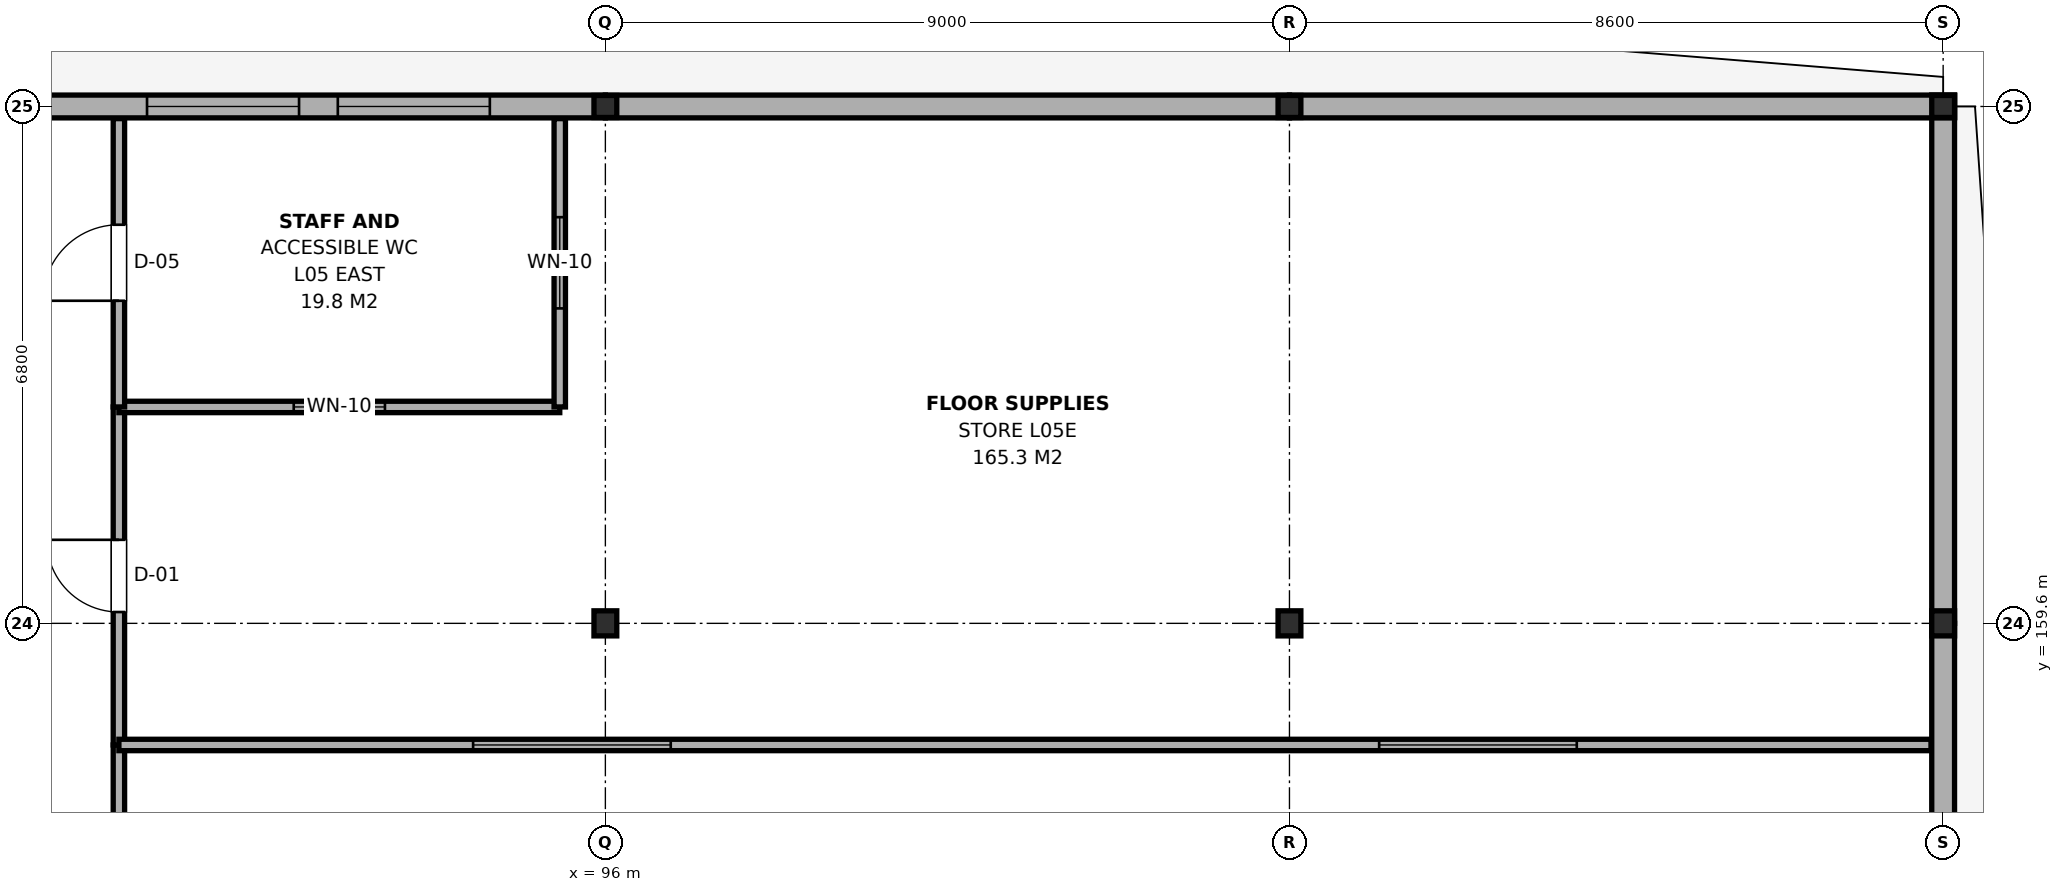
"""IFC4 building model, lengths in metres.
Left out: names, types, materials, properties, quantities, classifications, styles, units other than length and angle.
Written with IfcOpenShell. Run it as: python <this file> out.ifc"""

import sys

from ifc_helpers import new_model, si_unit, direction, frame, frame_2d, origin, origin_2d, place, context, subcontext, project, spatial, rectangle, i_section, extrude, element, fill, save


model = new_model("IFC4")
c1 = context("Model", 3, precision=1e-05, world=origin(), true_north=direction((0.0, 1.0)))
c2 = subcontext(c1, "Body", "Model", "MODEL_VIEW")
j1 = project(units=[si_unit("LENGTHUNIT", "METRE"), si_unit("PLANEANGLEUNIT", "RADIAN")], contexts=[c1])
p1 = place(None, origin())
s1 = spatial("IfcSite", under=j1, at=p1, CompositionType="ELEMENT")
p2 = place(p1, origin())
s2 = spatial("IfcBuilding", under=s1, at=p2, CompositionType="ELEMENT")
p3 = place(p2, frame((0.0, 0.0, 21.0)))
s3 = spatial("IfcBuildingStorey", under=s2, at=p3, CompositionType="ELEMENT", Elevation=21.0)
p4 = place(p3, frame((96.0, 159.6, 0.0), z_axis=(0.0, 0.0, 1.0), x_axis=(1.0, 0.0, 0.0)))
e1 = element("IfcColumn", 1, at=p4, inside=s3, PredefinedType="COLUMN", context=c2, shape_type="SweptSolid", body=[
    extrude(i_section(OverallWidth=0.3, OverallDepth=0.33, WebThickness=0.01, FlangeThickness=0.017, FilletRadius=0.027, at=origin_2d()), origin(), (0.0, 0.0, 1.0), 3.7),
])
p5 = place(p3, frame((96.0, 166.4, 0.0), z_axis=(0.0, 0.0, 1.0), x_axis=(1.0, 0.0, 0.0)))
e2 = element("IfcColumn", 2, at=p5, inside=s3, PredefinedType="COLUMN", context=c2, shape_type="SweptSolid", body=[
    extrude(i_section(OverallWidth=0.3, OverallDepth=0.29, WebThickness=0.009, FlangeThickness=0.014, FilletRadius=0.027, at=origin_2d()), origin(), (0.0, 0.0, 1.0), 3.7),
])
p6 = place(p3, frame((105.0, 159.6, 0.0), z_axis=(0.0, 0.0, 1.0), x_axis=(1.0, 0.0, 0.0)))
e3 = element("IfcColumn", 3, at=p6, inside=s3, PredefinedType="COLUMN", context=c2, shape_type="SweptSolid", body=[
    extrude(i_section(OverallWidth=0.3, OverallDepth=0.33, WebThickness=0.01, FlangeThickness=0.017, FilletRadius=0.027, at=origin_2d()), origin(), (0.0, 0.0, 1.0), 3.7),
])
p7 = place(p3, frame((105.0, 166.4, 0.0), z_axis=(0.0, 0.0, 1.0), x_axis=(1.0, 0.0, 0.0)))
e4 = element("IfcColumn", 4, at=p7, inside=s3, PredefinedType="COLUMN", context=c2, shape_type="SweptSolid", body=[
    extrude(i_section(OverallWidth=0.3, OverallDepth=0.29, WebThickness=0.009, FlangeThickness=0.014, FilletRadius=0.027, at=origin_2d()), origin(), (0.0, 0.0, 1.0), 3.7),
])
p8 = place(p3, frame((113.6, 159.6, 0.0), z_axis=(0.0, 0.0, 1.0), x_axis=(1.0, 0.0, 0.0)))
e5 = element("IfcColumn", 5, at=p8, inside=s3, PredefinedType="COLUMN", context=c2, shape_type="SweptSolid", body=[
    extrude(i_section(OverallWidth=0.3, OverallDepth=0.33, WebThickness=0.01, FlangeThickness=0.017, FilletRadius=0.027, at=origin_2d()), origin(), (0.0, 0.0, 1.0), 3.7),
])
p9 = place(p3, frame((113.6, 166.4, 0.0), z_axis=(0.0, 0.0, 1.0), x_axis=(1.0, 0.0, 0.0)))
e6 = element("IfcColumn", 6, at=p9, inside=s3, PredefinedType="COLUMN", context=c2, shape_type="SweptSolid", body=[
    extrude(i_section(OverallWidth=0.3, OverallDepth=0.29, WebThickness=0.009, FlangeThickness=0.014, FilletRadius=0.027, at=origin_2d()), origin(), (0.0, 0.0, 1.0), 3.7),
])
p10 = place(p3, frame((113.6, 152.4, 0.0), z_axis=(0.0, 0.0, 1.0), x_axis=(0.0, 1.0, 0.0)))
e7 = element("IfcWall", 7, at=p10, inside=s3, PredefinedType="SOLIDWALL", context=c2, shape_type="SweptSolid", body=[
    extrude(rectangle(XDim=7.2, YDim=0.3, at=frame_2d((3.6, 0.0))), origin(), (0.0, 0.0, 1.0), 3.095),
])
p11 = place(p10, frame((2.7, 0.0, 0.65)))
e8 = element("IfcOpeningElement", 8, at=p11, cuts=e7, PredefinedType="OPENING", context=c2, shape_type="SweptSolid", body=[
    extrude(rectangle(XDim=1.8, YDim=1.2, at=frame_2d((0.9, 0.6))), frame((0.0, 0.165, 0.0), z_axis=(0.0, -1.0, 0.0), x_axis=(1.0, 0.0, 0.0)), (0.0, 0.0, 1.0), 0.33),
])
p12 = place(p3, frame((113.6, 159.6, 0.0), z_axis=(0.0, 0.0, 1.0), x_axis=(0.0, 1.0, 0.0)))
e9 = element("IfcWall", 9, at=p12, inside=s3, PredefinedType="SOLIDWALL", context=c2, shape_type="SweptSolid", body=[
    extrude(rectangle(XDim=6.95, YDim=0.3, at=frame_2d((3.475, 0.0))), origin(), (0.0, 0.0, 1.0), 3.095),
])
p13 = place(p3, frame((87.0, 166.4, 0.0), z_axis=(0.0, 0.0, 1.0), x_axis=(1.0, 0.0, 0.0)))
e10 = element("IfcWall", 10, at=p13, inside=s3, PredefinedType="SOLIDWALL", context=c2, shape_type="SweptSolid", body=[
    extrude(rectangle(XDim=9.0, YDim=0.3, at=frame_2d((4.5, 0.0))), origin(), (0.0, 0.0, 1.0), 3.155),
])
p14 = place(p13, frame((2.97, 0.0, 0.65)))
e11 = element("IfcOpeningElement", 11, at=p14, cuts=e10, PredefinedType="OPENING", context=c2, shape_type="SweptSolid", body=[
    extrude(rectangle(XDim=2.0, YDim=1.8, at=frame_2d((1.0, 0.9))), frame((0.0, 0.165, 0.0), z_axis=(0.0, -1.0, 0.0), x_axis=(1.0, 0.0, 0.0)), (0.0, 0.0, 1.0), 0.33),
])
p15 = place(p13, frame((5.48, 0.0, 0.65)))
e12 = element("IfcOpeningElement", 12, at=p15, cuts=e10, PredefinedType="OPENING", context=c2, shape_type="SweptSolid", body=[
    extrude(rectangle(XDim=2.0, YDim=1.8, at=frame_2d((1.0, 0.9))), frame((0.0, 0.165, 0.0), z_axis=(0.0, -1.0, 0.0), x_axis=(1.0, 0.0, 0.0)), (0.0, 0.0, 1.0), 0.33),
])
p16 = place(p3, frame((96.0, 166.4, 0.0), z_axis=(0.0, 0.0, 1.0), x_axis=(1.0, 0.0, 0.0)))
e13 = element("IfcWall", 13, at=p16, inside=s3, PredefinedType="SOLIDWALL", context=c2, shape_type="SweptSolid", body=[
    extrude(rectangle(XDim=9.0, YDim=0.3, at=frame_2d((4.5, 0.0))), origin(), (0.0, 0.0, 1.0), 3.205),
])
p17 = place(p3, frame((105.0, 166.4, 0.0), z_axis=(0.0, 0.0, 1.0), x_axis=(1.0, 0.0, 0.0)))
e14 = element("IfcWall", 14, at=p17, inside=s3, PredefinedType="SOLIDWALL", context=c2, shape_type="SweptSolid", body=[
    extrude(rectangle(XDim=8.75, YDim=0.3, at=frame_2d((4.375, 0.0))), origin(), (0.0, 0.0, 1.0), 3.255),
])
p18 = place(p3, frame((89.6, 150.0, 0.0), z_axis=(0.0, 0.0, 1.0), x_axis=(0.0, 1.0, 0.0)))
e15 = element("IfcWall", 15, at=p18, inside=s3, PredefinedType="PARTITIONING", context=c2, shape_type="SweptSolid", body=[
    extrude(rectangle(XDim=8.0, YDim=0.15, at=frame_2d((4.0, 0.0))), origin(), (0.0, 0.0, 1.0), 3.105),
])
p19 = place(p18, frame((3.475, 0.0, 0.0)))
e16 = element("IfcOpeningElement", 16, at=p19, cuts=e15, PredefinedType="OPENING", context=c2, shape_type="SweptSolid", body=[
    extrude(rectangle(XDim=1.05, YDim=2.15, at=frame_2d((0.525, 1.075))), frame((0.0, 0.09, 0.0), z_axis=(0.0, -1.0, 0.0), x_axis=(1.0, 0.0, 0.0)), (0.0, 0.0, 1.0), 0.18),
])
p20 = place(p3, frame((89.6, 158.0, 0.0), z_axis=(0.0, 0.0, 1.0), x_axis=(0.0, 1.0, 0.0)))
e17 = element("IfcWall", 17, at=p20, inside=s3, PredefinedType="PARTITIONING", context=c2, shape_type="SweptSolid", body=[
    extrude(rectangle(XDim=4.447, YDim=0.15, at=frame_2d((2.224, 0.0))), origin(), (0.0, 0.0, 1.0), 3.305),
])
p21 = place(p20, frame((1.749, 0.0, 0.0)))
e18 = element("IfcOpeningElement", 18, at=p21, cuts=e17, PredefinedType="OPENING", context=c2, shape_type="SweptSolid", body=[
    extrude(rectangle(XDim=0.95, YDim=2.15, at=frame_2d((0.475, 1.075))), frame((0.0, 0.09, 0.0), z_axis=(0.0, -1.0, 0.0), x_axis=(1.0, 0.0, 0.0)), (0.0, 0.0, 1.0), 0.18),
])
p22 = place(p3, frame((89.6, 162.447, 0.0), z_axis=(0.0, 0.0, 1.0), x_axis=(1.0, 0.0, 0.0)))
e19 = element("IfcWall", 19, at=p22, inside=s3, PredefinedType="PARTITIONING", context=c2, shape_type="SweptSolid", body=[
    extrude(rectangle(XDim=5.8, YDim=0.15, at=frame_2d((2.9, 0.0))), origin(), (0.0, 0.0, 1.0), 3.695),
])
p23 = place(p22, frame((2.3, 0.0, 0.95)))
e20 = element("IfcOpeningElement", 20, at=p23, cuts=e19, PredefinedType="OPENING", context=c2, shape_type="SweptSolid", body=[
    extrude(rectangle(XDim=1.2, YDim=1.5, at=frame_2d((0.6, 0.75))), frame((0.0, 0.09, 0.0), z_axis=(0.0, -1.0, 0.0), x_axis=(1.0, 0.0, 0.0)), (0.0, 0.0, 1.0), 0.18),
])
p24 = place(p3, frame((95.4, 162.447, 0.0), z_axis=(0.0, 0.0, 1.0), x_axis=(0.0, 1.0, 0.0)))
e21 = element("IfcWall", 21, at=p24, inside=s3, PredefinedType="PARTITIONING", context=c2, shape_type="SweptSolid", body=[
    extrude(rectangle(XDim=3.793, YDim=0.15, at=frame_2d((1.896, 0.0))), origin(), (0.0, 0.0, 1.0), 3.205),
])
p25 = place(p24, frame((1.296, 0.0, 0.95)))
e22 = element("IfcOpeningElement", 22, at=p25, cuts=e21, PredefinedType="OPENING", context=c2, shape_type="SweptSolid", body=[
    extrude(rectangle(XDim=1.2, YDim=1.5, at=frame_2d((0.6, 0.75))), frame((0.0, 0.09, 0.0), z_axis=(0.0, -1.0, 0.0), x_axis=(1.0, 0.0, 0.0)), (0.0, 0.0, 1.0), 0.18),
])
p26 = place(p3, frame((89.6, 162.447, 0.0), z_axis=(0.0, 0.0, 1.0), x_axis=(0.0, 1.0, 0.0)))
e23 = element("IfcWall", 23, at=p26, inside=s3, PredefinedType="PARTITIONING", context=c2, shape_type="SweptSolid", body=[
    extrude(rectangle(XDim=3.793, YDim=0.15, at=frame_2d((1.896, 0.0))), origin(), (0.0, 0.0, 1.0), 3.205),
])
p27 = place(p26, frame((1.397, 0.0, 0.0)))
e24 = element("IfcOpeningElement", 24, at=p27, cuts=e23, PredefinedType="OPENING", context=c2, shape_type="SweptSolid", body=[
    extrude(rectangle(XDim=1.0, YDim=2.15, at=frame_2d((0.5, 1.075))), frame((0.0, 0.09, 0.0), z_axis=(0.0, -1.0, 0.0), x_axis=(1.0, 0.0, 0.0)), (0.0, 0.0, 1.0), 0.18),
])
p28 = place(p3, frame((89.6, 158.0, 0.0), z_axis=(0.0, 0.0, 1.0), x_axis=(1.0, 0.0, 0.0)))
e25 = element("IfcWall", 25, at=p28, inside=s3, PredefinedType="PARTITIONING", context=c2, shape_type="SweptSolid", body=[
    extrude(rectangle(XDim=23.84, YDim=0.15, at=frame_2d((11.92, 0.0))), origin(), (0.0, 0.0, 1.0), 3.365),
])
p29 = place(p28, frame((4.66, 0.0, 0.95)))
e26 = element("IfcOpeningElement", 26, at=p29, cuts=e25, PredefinedType="OPENING", context=c2, shape_type="SweptSolid", body=[
    extrude(rectangle(XDim=2.6, YDim=1.5, at=frame_2d((1.3, 0.75))), frame((0.0, 0.09, 0.0), z_axis=(0.0, -1.0, 0.0), x_axis=(1.0, 0.0, 0.0)), (0.0, 0.0, 1.0), 0.18),
])
p30 = place(p28, frame((16.58, 0.0, 0.95)))
e27 = element("IfcOpeningElement", 27, at=p30, cuts=e25, PredefinedType="OPENING", context=c2, shape_type="SweptSolid", body=[
    extrude(rectangle(XDim=2.6, YDim=1.5, at=frame_2d((1.3, 0.75))), frame((0.0, 0.09, 0.0), z_axis=(0.0, -1.0, 0.0), x_axis=(1.0, 0.0, 0.0)), (0.0, 0.0, 1.0), 0.18),
])
p31 = place(p14, origin())
e28 = element("IfcWindow", 28, at=p31, inside=s3, PartitioningType="SINGLE_PANEL", PredefinedType="WINDOW", context=c2, shape_type="SweptSolid", body=[
    extrude(rectangle(XDim=2.0, YDim=1.8, at=frame_2d((1.0, 0.9))), frame((0.0, 0.03, 0.0), z_axis=(0.0, -1.0, 0.0), x_axis=(1.0, 0.0, 0.0)), (0.0, 0.0, 1.0), 0.06),
])
fill(e11, e28)
p32 = place(p15, origin())
e29 = element("IfcWindow", 29, at=p32, inside=s3, PartitioningType="SINGLE_PANEL", PredefinedType="WINDOW", context=c2, shape_type="SweptSolid", body=[
    extrude(rectangle(XDim=2.0, YDim=1.8, at=frame_2d((1.0, 0.9))), frame((0.0, 0.03, 0.0), z_axis=(0.0, -1.0, 0.0), x_axis=(1.0, 0.0, 0.0)), (0.0, 0.0, 1.0), 0.06),
])
fill(e12, e29)
p33 = place(p21, origin())
e30 = element("IfcDoor", 30, at=p33, inside=s3, OperationType="SINGLE_SWING_RIGHT", PredefinedType="DOOR", context=c2, shape_type="SweptSolid", body=[
    extrude(rectangle(XDim=0.95, YDim=2.15, at=frame_2d((0.475, 1.075))), frame((0.0, 0.025, 0.0), z_axis=(0.0, -1.0, 0.0), x_axis=(1.0, 0.0, 0.0)), (0.0, 0.0, 1.0), 0.05),
])
fill(e18, e30)
p34 = place(p23, origin())
e31 = element("IfcWindow", 31, at=p34, inside=s3, PartitioningType="SINGLE_PANEL", PredefinedType="WINDOW", context=c2, shape_type="SweptSolid", body=[
    extrude(rectangle(XDim=1.2, YDim=1.5, at=frame_2d((0.6, 0.75))), frame((0.0, 0.03, 0.0), z_axis=(0.0, -1.0, 0.0), x_axis=(1.0, 0.0, 0.0)), (0.0, 0.0, 1.0), 0.06),
])
fill(e20, e31)
p35 = place(p25, origin())
e32 = element("IfcWindow", 32, at=p35, inside=s3, PartitioningType="SINGLE_PANEL", PredefinedType="WINDOW", context=c2, shape_type="SweptSolid", body=[
    extrude(rectangle(XDim=1.2, YDim=1.5, at=frame_2d((0.6, 0.75))), frame((0.0, 0.03, 0.0), z_axis=(0.0, -1.0, 0.0), x_axis=(1.0, 0.0, 0.0)), (0.0, 0.0, 1.0), 0.06),
])
fill(e22, e32)
p36 = place(p27, origin())
e33 = element("IfcDoor", 33, at=p36, inside=s3, OperationType="SINGLE_SWING_LEFT", PredefinedType="DOOR", context=c2, shape_type="SweptSolid", body=[
    extrude(rectangle(XDim=1.0, YDim=2.15, at=frame_2d((0.5, 1.075))), frame((0.0, 0.025, 0.0), z_axis=(0.0, -1.0, 0.0), x_axis=(1.0, 0.0, 0.0)), (0.0, 0.0, 1.0), 0.05),
])
fill(e24, e33)
p37 = place(p29, origin())
e34 = element("IfcWindow", 34, at=p37, inside=s3, PartitioningType="SINGLE_PANEL", PredefinedType="WINDOW", context=c2, shape_type="SweptSolid", body=[
    extrude(rectangle(XDim=2.6, YDim=1.5, at=frame_2d((1.3, 0.75))), frame((0.0, 0.03, 0.0), z_axis=(0.0, -1.0, 0.0), x_axis=(1.0, 0.0, 0.0)), (0.0, 0.0, 1.0), 0.06),
])
fill(e26, e34)
p38 = place(p30, origin())
e35 = element("IfcWindow", 35, at=p38, inside=s3, PartitioningType="SINGLE_PANEL", PredefinedType="WINDOW", context=c2, shape_type="SweptSolid", body=[
    extrude(rectangle(XDim=2.6, YDim=1.5, at=frame_2d((1.3, 0.75))), frame((0.0, 0.03, 0.0), z_axis=(0.0, -1.0, 0.0), x_axis=(1.0, 0.0, 0.0)), (0.0, 0.0, 1.0), 0.06),
])
fill(e27, e35)
save(model, sys.argv[1])
